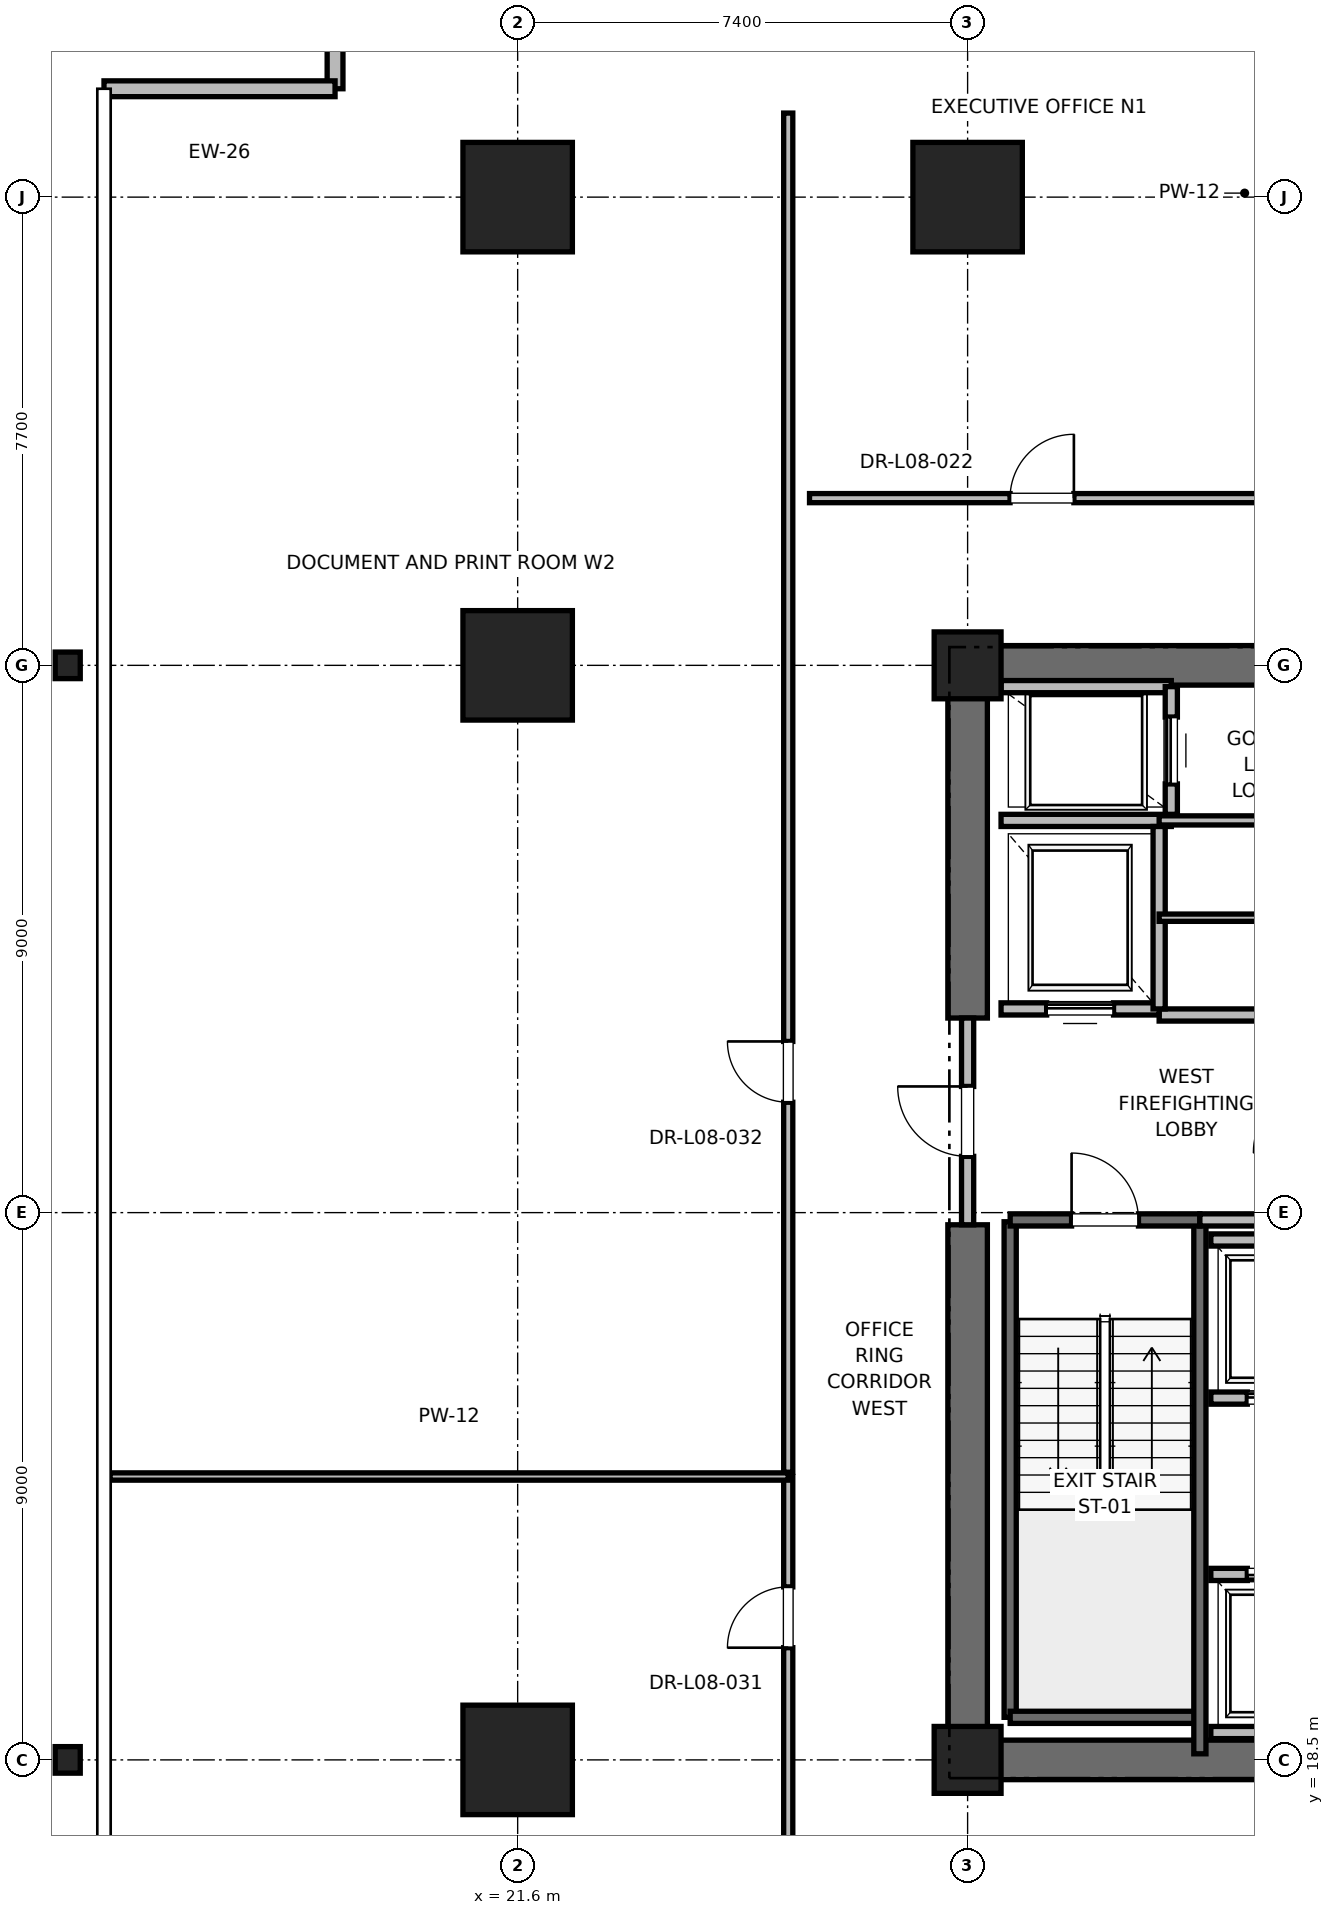
"""IFC4 building model, lengths in metres.
Left out: names, types, materials, properties, quantities, classifications, styles, units other than length and angle.
Written with IfcOpenShell. Run it as: python <this file> out.ifc"""

import sys

from ifc_helpers import new_model, si_unit, direction, frame, frame_2d, origin, origin_2d, place, context, subcontext, project, spatial, rectangle, i_section, extrude, element, fill, save


model = new_model("IFC4")
c1 = context("Model", 3, precision=1e-05, world=origin(), true_north=direction((0.0, 1.0)))
c2 = subcontext(c1, "Body", "Model", "MODEL_VIEW")
j1 = project(units=[si_unit("LENGTHUNIT", "METRE"), si_unit("PLANEANGLEUNIT", "RADIAN")], contexts=[c1])
p1 = place(None, origin())
s1 = spatial("IfcSite", under=j1, at=p1, CompositionType="ELEMENT")
p2 = place(p1, origin())
s2 = spatial("IfcBuilding", under=s1, at=p2, CompositionType="ELEMENT")
p3 = place(p2, frame((0.0, 0.0, 39.6)))
s3 = spatial("IfcBuildingStorey", under=s2, at=p3, CompositionType="ELEMENT", Elevation=39.6)
for number, where, z_axis, x_axis in (
    (1, (29.0, 44.2, 0.0), (0.0, 0.0, 1.0), (1.0, 0.0, 0.0)),
    (2, (21.6, 18.5, 0.0), (0.0, 0.0, 1.0), (1.0, 0.0, 0.0)),
    (3, (21.6, 36.5, 0.0), (0.0, 0.0, 1.0), (1.0, 0.0, 0.0)),
    (4, (21.6, 44.2, 0.0), (0.0, 0.0, 1.0), (1.0, 0.0, 0.0)),
):
    element("IfcColumn", number, at=place(p3, frame(where, z_axis=z_axis, x_axis=x_axis)), inside=s3, PredefinedType="COLUMN", context=c2, shape_type="SweptSolid", body=[
        extrude(rectangle(XDim=1.8, YDim=1.8, at=origin_2d()), origin(), (0.0, 0.0, 1.0), 4.0),
    ])
for number, where, z_axis, x_axis in (
    (5, (14.2, 18.5, 0.0), (0.0, 0.0, 1.0), (1.0, 0.0, 0.0)),
    (6, (14.2, 36.5, 0.0), (0.0, 0.0, 1.0), (1.0, 0.0, 0.0)),
):
    element("IfcColumn", number, at=place(p3, frame(where, z_axis=z_axis, x_axis=x_axis)), inside=s3, PredefinedType="COLUMN", context=c2, shape_type="SweptSolid", body=[
        extrude(i_section(OverallWidth=0.412, OverallDepth=0.437, WebThickness=0.036, FlangeThickness=0.058, FilletRadius=0.015, at=origin_2d()), origin(), (0.0, 0.0, 1.0), 4.0),
    ])
for number, where, z_axis, x_axis in (
    (7, (29.0, 18.5, 0.0), (0.0, 0.0, 1.0), (1.0, 0.0, 0.0)),
    (8, (29.0, 36.5, 0.0), (0.0, 0.0, 1.0), (1.0, 0.0, 0.0)),
):
    element("IfcColumn", number, at=place(p3, frame(where, z_axis=z_axis, x_axis=x_axis)), inside=s3, PredefinedType="PILASTER", context=c2, shape_type="SweptSolid", body=[
        extrude(rectangle(XDim=1.1, YDim=1.1, at=origin_2d()), origin(), (0.0, 0.0, 1.0), 4.0),
    ])
p4 = place(p3, frame((29.0, 18.5, 0.0), z_axis=(0.0, 0.0, 1.0), x_axis=(1.0, 0.0, 0.0)))
e9 = element("IfcWall", 9, at=p4, inside=s3, PredefinedType="SHEAR", context=c2, shape_type="SweptSolid", body=[
    extrude(rectangle(XDim=9.2, YDim=0.65, at=frame_2d((4.6, 0.0))), origin(), (0.0, 0.0, 1.0), 3.76),
])
p5 = place(p3, frame((29.0, 36.5, 0.0), z_axis=(0.0, 0.0, 1.0), x_axis=(1.0, 0.0, 0.0)))
e10 = element("IfcWall", 10, at=p5, inside=s3, PredefinedType="SHEAR", context=c2, shape_type="SweptSolid", body=[
    extrude(rectangle(XDim=5.8, YDim=0.65, at=frame_2d((2.9, 0.0))), origin(), (0.0, 0.0, 1.0), 3.76),
])
p6 = place(p3, frame((29.0, 18.5, 0.0), z_axis=(0.0, 0.0, 1.0), x_axis=(0.0, 1.0, 0.0)))
e11 = element("IfcWall", 11, at=p6, inside=s3, PredefinedType="SHEAR", context=c2, shape_type="SweptSolid", body=[
    extrude(rectangle(XDim=8.8, YDim=0.65, at=frame_2d((4.4, 0.0))), origin(), (0.0, 0.0, 1.0), 3.76),
])
p7 = place(p3, frame((29.0, 30.7, 0.0), z_axis=(0.0, 0.0, 1.0), x_axis=(0.0, 1.0, 0.0)))
e12 = element("IfcWall", 12, at=p7, inside=s3, PredefinedType="SHEAR", context=c2, shape_type="SweptSolid", body=[
    extrude(rectangle(XDim=5.8, YDim=0.65, at=frame_2d((2.9, 0.0))), origin(), (0.0, 0.0, 1.0), 3.76),
])
p8 = place(p3, frame((18.597, 49.382, 0.0), z_axis=(0.0, 0.0, 1.0), x_axis=(0.0, -1.0, 0.0)))
e13 = element("IfcWall", 13, at=p8, inside=s3, PredefinedType="PARAPET", context=c2, shape_type="SweptSolid", body=[
    extrude(rectangle(XDim=3.4, YDim=0.26, at=frame_2d((1.7, 0.0))), origin(), (0.0, 0.0, 1.0), 3.76),
])
p9 = place(p8, frame((0.8, 0.0, 0.85)))
e14 = element("IfcOpeningElement", 14, at=p9, cuts=e13, PredefinedType="OPENING", context=c2, shape_type="SweptSolid", body=[
    extrude(rectangle(XDim=1.8, YDim=2.2, at=frame_2d((0.9, 1.1))), frame((0.0, 0.13, 0.0), z_axis=(0.0, -1.0, 0.0), x_axis=(1.0, 0.0, 0.0)), (0.0, 0.0, 1.0), 0.26),
])
p10 = place(p3, frame((18.597, 45.982, 0.0), z_axis=(0.0, 0.0, 1.0), x_axis=(-1.0, 0.0, 0.0)))
e15 = element("IfcWall", 15, at=p10, inside=s3, PredefinedType="PARAPET", context=c2, shape_type="SweptSolid", body=[
    extrude(rectangle(XDim=3.8, YDim=0.26, at=frame_2d((1.9, 0.0))), origin(), (0.0, 0.0, 1.0), 3.76),
])
p11 = place(p3, frame((29.7, 19.2, 0.0), z_axis=(0.0, 0.0, 1.0), x_axis=(0.0, 1.0, 0.0)))
e16 = element("IfcWall", 16, at=p11, inside=s3, PredefinedType="SOLIDWALL", context=c2, shape_type="SweptSolid", body=[
    extrude(rectangle(XDim=8.15, YDim=0.2, at=frame_2d((4.075, 0.0))), origin(), (0.0, 0.0, 1.0), 3.76),
])
p12 = place(p3, frame((29.7, 19.2, 0.0), z_axis=(0.0, 0.0, 1.0), x_axis=(1.0, 0.0, 0.0)))
e17 = element("IfcWall", 17, at=p12, inside=s3, PredefinedType="SOLIDWALL", context=c2, shape_type="SweptSolid", body=[
    extrude(rectangle(XDim=3.12, YDim=0.2, at=frame_2d((1.56, 0.0))), origin(), (0.0, 0.0, 1.0), 3.76),
])
p13 = place(p3, frame((32.82, 18.6, 0.0), z_axis=(0.0, 0.0, 1.0), x_axis=(0.0, 1.0, 0.0)))
e18 = element("IfcWall", 18, at=p13, inside=s3, PredefinedType="SOLIDWALL", context=c2, shape_type="SweptSolid", body=[
    extrude(rectangle(XDim=8.78, YDim=0.2, at=frame_2d((4.39, 0.0))), origin(), (0.0, 0.0, 1.0), 3.76),
])
p14 = place(p3, frame((29.7, 27.38, 0.0), z_axis=(0.0, 0.0, 1.0), x_axis=(1.0, 0.0, 0.0)))
e19 = element("IfcWall", 19, at=p14, inside=s3, PredefinedType="SOLIDWALL", context=c2, shape_type="SweptSolid", body=[
    extrude(rectangle(XDim=3.12, YDim=0.2, at=frame_2d((1.56, 0.0))), origin(), (0.0, 0.0, 1.0), 3.76),
])
p15 = place(p14, frame((1.01, 0.0, 0.0)))
e20 = element("IfcOpeningElement", 20, at=p15, cuts=e19, PredefinedType="OPENING", context=c2, shape_type="SweptSolid", body=[
    extrude(rectangle(XDim=1.1, YDim=2.15, at=frame_2d((0.55, 1.075))), frame((0.0, 0.1, 0.0), z_axis=(0.0, -1.0, 0.0), x_axis=(1.0, 0.0, 0.0)), (0.0, 0.0, 1.0), 0.2),
])
p16 = place(p3, frame((29.0, 27.3, 0.0), z_axis=(0.0, 0.0, 1.0), x_axis=(0.0, 1.0, 0.0)))
e21 = element("IfcWall", 21, at=p16, inside=s3, PredefinedType="PARTITIONING", context=c2, shape_type="SweptSolid", body=[
    extrude(rectangle(XDim=3.4, YDim=0.2, at=frame_2d((1.7, 0.0))), origin(), (0.0, 0.0, 1.0), 2.54),
])
p17 = place(p16, frame((1.125, 0.0, 0.0)))
e22 = element("IfcOpeningElement", 22, at=p17, cuts=e21, PredefinedType="OPENING", context=c2, shape_type="SweptSolid", body=[
    extrude(rectangle(XDim=1.15, YDim=2.2, at=frame_2d((0.575, 1.1))), frame((0.0, 0.1, 0.0), z_axis=(0.0, -1.0, 0.0), x_axis=(1.0, 0.0, 0.0)), (0.0, 0.0, 1.0), 0.2),
])
p18 = place(p3, frame((32.82, 27.38, 0.0), z_axis=(0.0, 0.0, 1.0), x_axis=(1.0, 0.0, 0.0)))
e23 = element("IfcWall", 23, at=p18, inside=s3, PredefinedType="PARTITIONING", context=c2, shape_type="SweptSolid", body=[
    extrude(rectangle(XDim=5.62, YDim=0.2, at=frame_2d((2.81, 0.0))), origin(), (0.0, 0.0, 1.0), 3.76),
])
p19 = place(p3, frame((32.15, 30.75, 0.0), z_axis=(0.0, 0.0, 1.0), x_axis=(1.0, 0.0, 0.0)))
e24 = element("IfcWall", 24, at=p19, inside=s3, PredefinedType="PARTITIONING", context=c2, shape_type="SweptSolid", body=[
    extrude(rectangle(XDim=3.13, YDim=0.2, at=frame_2d((1.565, 0.0))), origin(), (0.0, 0.0, 1.0), 3.76),
])
p20 = place(p3, frame((29.55, 30.85, 0.0), z_axis=(0.0, 0.0, 1.0), x_axis=(1.0, 0.0, 0.0)))
e25 = element("IfcWall", 25, at=p20, inside=s3, PredefinedType="SOLIDWALL", context=c2, shape_type="SweptSolid", body=[
    extrude(rectangle(XDim=2.6, YDim=0.2, at=frame_2d((1.3, 0.0))), origin(), (0.0, 0.0, 1.0), 2.54),
])
p21 = place(p20, frame((0.75, 0.0, 0.0)))
e26 = element("IfcOpeningElement", 26, at=p21, cuts=e25, PredefinedType="OPENING", context=c2, shape_type="SweptSolid", body=[
    extrude(rectangle(XDim=1.1, YDim=2.2, at=frame_2d((0.55, 1.1))), frame((0.0, 0.1, 0.0), z_axis=(0.0, -1.0, 0.0), x_axis=(1.0, 0.0, 0.0)), (0.0, 0.0, 1.0), 0.2),
])
p22 = place(p3, frame((29.55, 33.95, 0.0), z_axis=(0.0, 0.0, 1.0), x_axis=(1.0, 0.0, 0.0)))
e27 = element("IfcWall", 27, at=p22, inside=s3, PredefinedType="SOLIDWALL", context=c2, shape_type="SweptSolid", body=[
    extrude(rectangle(XDim=2.8, YDim=0.2, at=frame_2d((1.4, 0.0))), origin(), (0.0, 0.0, 1.0), 3.76),
])
p23 = place(p3, frame((32.15, 30.85, 0.0), z_axis=(0.0, 0.0, 1.0), x_axis=(0.0, 1.0, 0.0)))
e28 = element("IfcWall", 28, at=p23, inside=s3, PredefinedType="SOLIDWALL", context=c2, shape_type="SweptSolid", body=[
    extrude(rectangle(XDim=3.0, YDim=0.2, at=frame_2d((1.5, 0.0))), origin(), (0.0, 0.0, 1.0), 3.76),
])
p24 = place(p3, frame((32.35, 36.15, 0.0), z_axis=(0.0, 0.0, 1.0), x_axis=(-1.0, 0.0, 0.0)))
e29 = element("IfcWall", 29, at=p24, inside=s3, PredefinedType="SOLIDWALL", context=c2, shape_type="SweptSolid", body=[
    extrude(rectangle(XDim=2.8, YDim=0.2, at=frame_2d((1.4, 0.0))), origin(), (0.0, 0.0, 1.0), 2.889),
])
p25 = place(p3, frame((32.35, 34.05, 0.0), z_axis=(0.0, 0.0, 1.0), x_axis=(0.0, 1.0, 0.0)))
e30 = element("IfcWall", 30, at=p25, inside=s3, PredefinedType="SOLIDWALL", context=c2, shape_type="SweptSolid", body=[
    extrude(rectangle(XDim=2.1, YDim=0.2, at=frame_2d((1.05, 0.0))), origin(), (0.0, 0.0, 1.0), 3.76),
])
p26 = place(p25, frame((0.5, 0.0, 0.0)))
e31 = element("IfcOpeningElement", 31, at=p26, cuts=e30, PredefinedType="OPENING", context=c2, shape_type="SweptSolid", body=[
    extrude(rectangle(XDim=1.1, YDim=2.2, at=frame_2d((0.55, 1.1))), frame((0.0, 0.1, 0.0), z_axis=(0.0, -1.0, 0.0), x_axis=(1.0, 0.0, 0.0)), (0.0, 0.0, 1.0), 0.2),
])
p27 = place(p3, frame((33.0, 18.95, 0.0), z_axis=(0.0, 0.0, 1.0), x_axis=(1.0, 0.0, 0.0)))
e32 = element("IfcWall", 32, at=p27, inside=s3, PredefinedType="SOLIDWALL", context=c2, shape_type="SweptSolid", body=[
    extrude(rectangle(XDim=2.3, YDim=0.2, at=frame_2d((1.15, 0.0))), origin(), (0.0, 0.0, 1.0), 3.76),
])
p28 = place(p3, frame((35.3, 21.55, 0.0), z_axis=(0.0, 0.0, 1.0), x_axis=(-1.0, 0.0, 0.0)))
e33 = element("IfcWall", 33, at=p28, inside=s3, PredefinedType="SOLIDWALL", context=c2, shape_type="SweptSolid", body=[
    extrude(rectangle(XDim=2.3, YDim=0.2, at=frame_2d((1.15, 0.0))), origin(), (0.0, 0.0, 1.0), 3.76),
])
p29 = place(p28, frame((0.6, 0.0, 0.0)))
e34 = element("IfcOpeningElement", 34, at=p29, cuts=e33, PredefinedType="OPENING", context=c2, shape_type="SweptSolid", body=[
    extrude(rectangle(XDim=1.1, YDim=2.2, at=frame_2d((0.55, 1.1))), frame((0.0, 0.1, 0.0), z_axis=(0.0, -1.0, 0.0), x_axis=(1.0, 0.0, 0.0)), (0.0, 0.0, 1.0), 0.2),
])
p30 = place(p3, frame((33.0, 24.45, 0.0), z_axis=(0.0, 0.0, 1.0), x_axis=(1.0, 0.0, 0.0)))
e35 = element("IfcWall", 35, at=p30, inside=s3, PredefinedType="SOLIDWALL", context=c2, shape_type="SweptSolid", body=[
    extrude(rectangle(XDim=2.3, YDim=0.2, at=frame_2d((1.15, 0.0))), origin(), (0.0, 0.0, 1.0), 3.76),
])
p31 = place(p30, frame((0.6, 0.0, 0.0)))
e36 = element("IfcOpeningElement", 36, at=p31, cuts=e35, PredefinedType="OPENING", context=c2, shape_type="SweptSolid", body=[
    extrude(rectangle(XDim=1.1, YDim=2.2, at=frame_2d((0.55, 1.1))), frame((0.0, 0.1, 0.0), z_axis=(0.0, -1.0, 0.0), x_axis=(1.0, 0.0, 0.0)), (0.0, 0.0, 1.0), 0.2),
])
p32 = place(p3, frame((35.3, 27.05, 0.0), z_axis=(0.0, 0.0, 1.0), x_axis=(-1.0, 0.0, 0.0)))
e37 = element("IfcWall", 37, at=p32, inside=s3, PredefinedType="SOLIDWALL", context=c2, shape_type="SweptSolid", body=[
    extrude(rectangle(XDim=2.3, YDim=0.2, at=frame_2d((1.15, 0.0))), origin(), (0.0, 0.0, 1.0), 3.76),
])
p33 = place(p3, frame((32.15, 33.95, 0.0), z_axis=(0.0, 0.0, 1.0), x_axis=(1.0, 0.0, 0.0)))
e38 = element("IfcWall", 38, at=p33, inside=s3, PredefinedType="PARTITIONING", context=c2, shape_type="SweptSolid", body=[
    extrude(rectangle(XDim=3.13, YDim=0.15, at=frame_2d((1.565, 0.0))), origin(), (0.0, 0.0, 1.0), 2.85),
])
p34 = place(p3, frame((32.15, 32.35, 0.0), z_axis=(0.0, 0.0, 1.0), x_axis=(1.0, 0.0, 0.0)))
e39 = element("IfcWall", 39, at=p34, inside=s3, PredefinedType="PARTITIONING", context=c2, shape_type="SweptSolid", body=[
    extrude(rectangle(XDim=3.13, YDim=0.12, at=frame_2d((1.565, 0.0))), origin(), (0.0, 0.0, 1.0), 2.85),
])
p35 = place(p3, frame((26.4, 39.25, 0.0), z_axis=(0.0, 0.0, 1.0), x_axis=(1.0, 0.0, 0.0)))
e40 = element("IfcWall", 40, at=p35, inside=s3, PredefinedType="PARTITIONING", context=c2, shape_type="SweptSolid", body=[
    extrude(rectangle(XDim=7.616, YDim=0.15, at=frame_2d((3.808, 0.0))), origin(), (0.0, 0.0, 1.0), 2.85),
])
p36 = place(p35, frame((3.298, 0.0, 0.0)))
e41 = element("IfcOpeningElement", 41, at=p36, cuts=e40, PredefinedType="OPENING", context=c2, shape_type="SweptSolid", body=[
    extrude(rectangle(XDim=1.05, YDim=2.2, at=frame_2d((0.525, 1.1))), frame((0.0, 0.075, 0.0), z_axis=(0.0, -1.0, 0.0), x_axis=(1.0, 0.0, 0.0)), (0.0, 0.0, 1.0), 0.15),
])
p37 = place(p3, frame((26.05, 9.418, 0.0), z_axis=(0.0, 0.0, 1.0), x_axis=(0.0, 1.0, 0.0)))
e42 = element("IfcWall", 42, at=p37, inside=s3, PredefinedType="PARTITIONING", context=c2, shape_type="SweptSolid", body=[
    extrude(rectangle(XDim=13.743, YDim=0.15, at=frame_2d((6.871, 0.0))), origin(), (0.0, 0.0, 1.0), 2.85),
])
p38 = place(p37, frame((10.927, 0.0, 0.0)))
e43 = element("IfcOpeningElement", 43, at=p38, cuts=e42, PredefinedType="OPENING", context=c2, shape_type="SweptSolid", body=[
    extrude(rectangle(XDim=1.0, YDim=2.15, at=frame_2d((0.5, 1.075))), frame((0.0, 0.075, 0.0), z_axis=(0.0, -1.0, 0.0), x_axis=(1.0, 0.0, 0.0)), (0.0, 0.0, 1.0), 0.15),
])
p39 = place(p3, frame((14.897, 23.16, 0.0), z_axis=(0.0, 0.0, 1.0), x_axis=(1.0, 0.0, 0.0)))
e44 = element("IfcWall", 44, at=p39, inside=s3, PredefinedType="PARTITIONING", context=c2, shape_type="SweptSolid", body=[
    extrude(rectangle(XDim=11.153, YDim=0.12, at=frame_2d((5.577, 0.0))), origin(), (0.0, 0.0, 1.0), 2.85),
])
p40 = place(p3, frame((26.05, 23.23, 0.0), z_axis=(0.0, 0.0, 1.0), x_axis=(0.0, 1.0, 0.0)))
e45 = element("IfcWall", 45, at=p40, inside=s3, PredefinedType="PARTITIONING", context=c2, shape_type="SweptSolid", body=[
    extrude(rectangle(XDim=22.352, YDim=0.15, at=frame_2d((11.176, 0.0))), origin(), (0.0, 0.0, 1.0), 2.85),
])
p41 = place(p40, frame((6.085, 0.0, 0.0)))
e46 = element("IfcOpeningElement", 46, at=p41, cuts=e45, PredefinedType="OPENING", context=c2, shape_type="SweptSolid", body=[
    extrude(rectangle(XDim=1.0, YDim=2.15, at=frame_2d((0.5, 1.075))), frame((0.0, 0.075, 0.0), z_axis=(0.0, -1.0, 0.0), x_axis=(1.0, 0.0, 0.0)), (0.0, 0.0, 1.0), 0.15),
])
p42 = place(p15, origin())
e47 = element("IfcDoor", 47, at=p42, inside=s3, OperationType="SINGLE_SWING_LEFT", PredefinedType="DOOR", context=c2, shape_type="SweptSolid", body=[
    extrude(rectangle(XDim=1.1, YDim=2.15, at=frame_2d((0.55, 1.075))), frame((0.0, 0.025, 0.0), z_axis=(0.0, -1.0, 0.0), x_axis=(1.0, 0.0, 0.0)), (0.0, 0.0, 1.0), 0.05),
])
fill(e20, e47)
p43 = place(p17, origin())
e48 = element("IfcDoor", 48, at=p43, inside=s3, OperationType="SINGLE_SWING_RIGHT", PredefinedType="DOOR", context=c2, shape_type="SweptSolid", body=[
    extrude(rectangle(XDim=1.15, YDim=2.2, at=frame_2d((0.575, 1.1))), frame((0.0, 0.025, 0.0), z_axis=(0.0, -1.0, 0.0), x_axis=(1.0, 0.0, 0.0)), (0.0, 0.0, 1.0), 0.05),
])
fill(e22, e48)
p44 = place(p21, origin())
e49 = element("IfcDoor", 49, at=p44, inside=s3, OperationType="SLIDING_TO_RIGHT", PredefinedType="DOOR", context=c2, shape_type="SweptSolid", body=[
    extrude(rectangle(XDim=1.1, YDim=2.2, at=frame_2d((0.55, 1.1))), frame((0.0, 0.025, 0.0), z_axis=(0.0, -1.0, 0.0), x_axis=(1.0, 0.0, 0.0)), (0.0, 0.0, 1.0), 0.05),
])
fill(e26, e49)
p45 = place(p26, origin())
e50 = element("IfcDoor", 50, at=p45, inside=s3, OperationType="SLIDING_TO_RIGHT", PredefinedType="DOOR", context=c2, shape_type="SweptSolid", body=[
    extrude(rectangle(XDim=1.1, YDim=2.2, at=frame_2d((0.55, 1.1))), frame((0.0, 0.025, 0.0), z_axis=(0.0, -1.0, 0.0), x_axis=(1.0, 0.0, 0.0)), (0.0, 0.0, 1.0), 0.05),
])
fill(e31, e50)
p46 = place(p29, origin())
e51 = element("IfcDoor", 51, at=p46, inside=s3, OperationType="SLIDING_TO_RIGHT", PredefinedType="DOOR", context=c2, shape_type="SweptSolid", body=[
    extrude(rectangle(XDim=1.1, YDim=2.2, at=frame_2d((0.55, 1.1))), frame((0.0, 0.025, 0.0), z_axis=(0.0, -1.0, 0.0), x_axis=(1.0, 0.0, 0.0)), (0.0, 0.0, 1.0), 0.05),
])
fill(e34, e51)
p47 = place(p31, origin())
e52 = element("IfcDoor", 52, at=p47, inside=s3, OperationType="SLIDING_TO_RIGHT", PredefinedType="DOOR", context=c2, shape_type="SweptSolid", body=[
    extrude(rectangle(XDim=1.1, YDim=2.2, at=frame_2d((0.55, 1.1))), frame((0.0, 0.025, 0.0), z_axis=(0.0, -1.0, 0.0), x_axis=(1.0, 0.0, 0.0)), (0.0, 0.0, 1.0), 0.05),
])
fill(e36, e52)
p48 = place(p36, origin())
e53 = element("IfcDoor", 53, at=p48, inside=s3, OperationType="SINGLE_SWING_RIGHT", PredefinedType="DOOR", context=c2, shape_type="SweptSolid", body=[
    extrude(rectangle(XDim=1.05, YDim=2.2, at=frame_2d((0.525, 1.1))), frame((0.0, 0.025, 0.0), z_axis=(0.0, -1.0, 0.0), x_axis=(1.0, 0.0, 0.0)), (0.0, 0.0, 1.0), 0.05),
])
fill(e41, e53)
p49 = place(p38, origin())
e54 = element("IfcDoor", 54, at=p49, inside=s3, OperationType="SINGLE_SWING_LEFT", PredefinedType="DOOR", context=c2, shape_type="SweptSolid", body=[
    extrude(rectangle(XDim=1.0, YDim=2.15, at=frame_2d((0.5, 1.075))), frame((0.0, 0.025, 0.0), z_axis=(0.0, -1.0, 0.0), x_axis=(1.0, 0.0, 0.0)), (0.0, 0.0, 1.0), 0.05),
])
fill(e43, e54)
p50 = place(p41, origin())
e55 = element("IfcDoor", 55, at=p50, inside=s3, OperationType="SINGLE_SWING_RIGHT", PredefinedType="DOOR", context=c2, shape_type="SweptSolid", body=[
    extrude(rectangle(XDim=1.0, YDim=2.15, at=frame_2d((0.5, 1.075))), frame((0.0, 0.025, 0.0), z_axis=(0.0, -1.0, 0.0), x_axis=(1.0, 0.0, 0.0)), (0.0, 0.0, 1.0), 0.05),
])
fill(e46, e55)
save(model, sys.argv[1])
